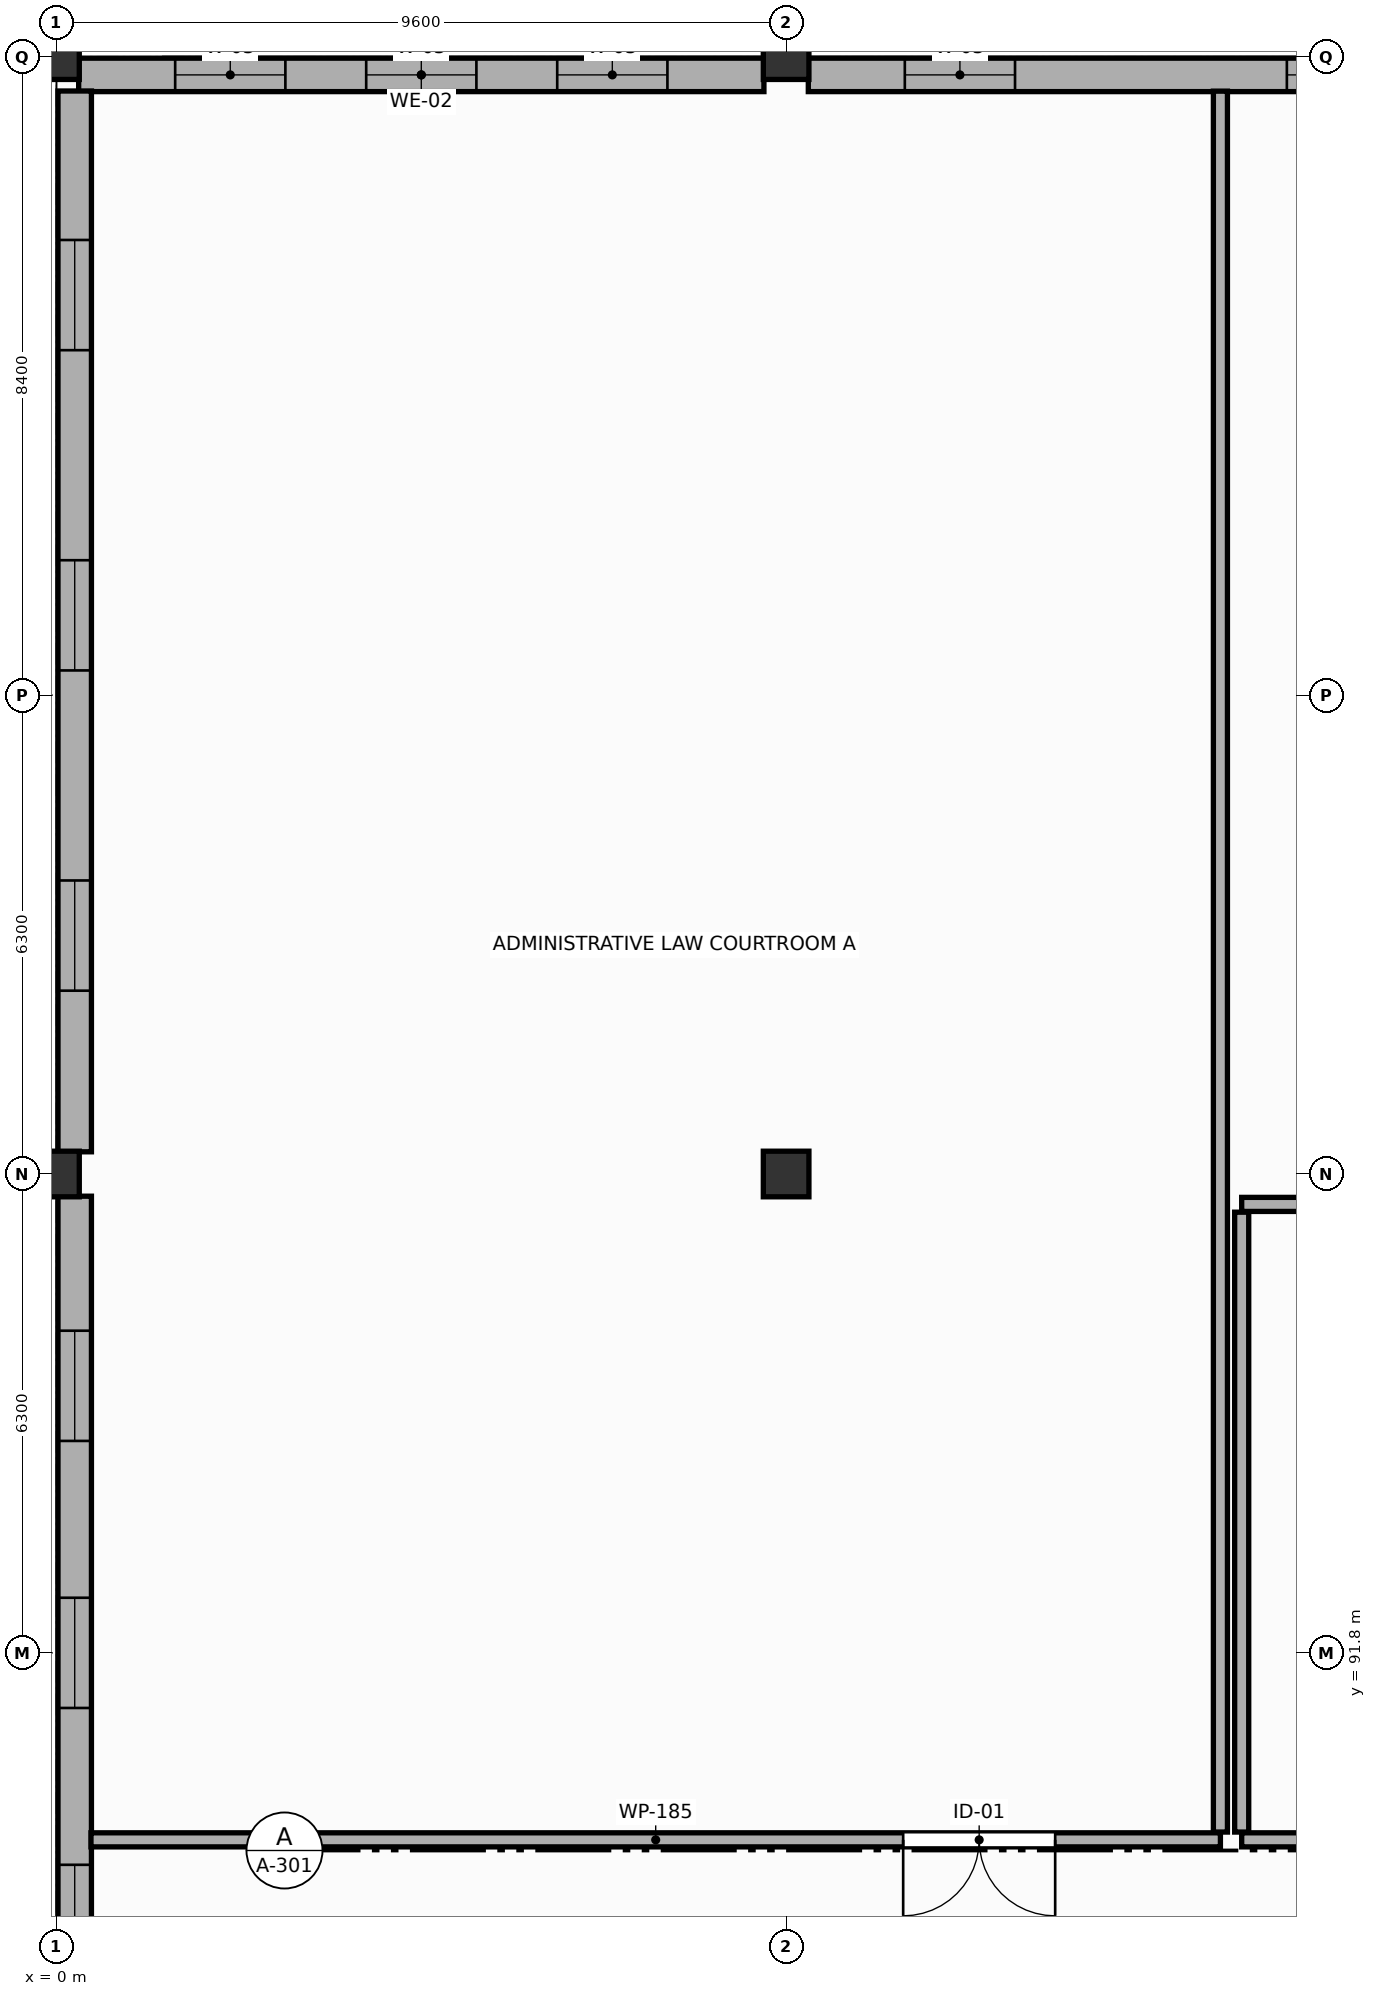
"""IFC4 building model, lengths in metres.
Left out: names, types, materials, properties, quantities, classifications, styles, units other than length and angle.
Written with IfcOpenShell. Run it as: python <this file> out.ifc"""

import sys

from ifc_helpers import new_model, si_unit, direction, frame, frame_2d, origin, origin_2d, place, context, subcontext, project, spatial, rectangle, extrude, element, fill, save


model = new_model("IFC4")
c1 = context("Model", 3, precision=1e-05, world=origin(), true_north=direction((0.0, 1.0)))
c2 = subcontext(c1, "Body", "Model", "MODEL_VIEW")
j1 = project(units=[si_unit("LENGTHUNIT", "METRE"), si_unit("PLANEANGLEUNIT", "RADIAN")], contexts=[c1])
p1 = place(None, origin())
s1 = spatial("IfcSite", under=j1, at=p1, CompositionType="ELEMENT")
p2 = place(p1, origin())
s2 = spatial("IfcBuilding", under=s1, at=p2, CompositionType="ELEMENT")
p3 = place(p2, frame((0.0, 0.0, 14.4)))
s3 = spatial("IfcBuildingStorey", under=s2, at=p3, CompositionType="ELEMENT", Elevation=14.4)
for number, where, z_axis, x_axis in (
    (1, (0.0, 98.1, 0.0), (0.0, 0.0, 1.0), (1.0, 0.0, 0.0)),
    (2, (0.0, 112.8, 0.0), (0.0, 0.0, 1.0), (1.0, 0.0, 0.0)),
    (3, (9.6, 98.1, 0.0), (0.0, 0.0, 1.0), (1.0, 0.0, 0.0)),
    (4, (9.6, 112.8, 0.0), (0.0, 0.0, 1.0), (1.0, 0.0, 0.0)),
):
    element("IfcColumn", number, at=place(p3, frame(where, z_axis=z_axis, x_axis=x_axis)), inside=s3, PredefinedType="COLUMN", context=c2, shape_type="SweptSolid", body=[
        extrude(rectangle(XDim=0.6, YDim=0.6, at=origin_2d()), origin(), (0.0, 0.0, 1.0), 4.2),
    ])
p4 = place(p3, frame((0.292, 112.56, 0.0), z_axis=(0.0, 0.0, 1.0), x_axis=(1.0, 0.0, 0.0)))
e5 = element("IfcWall", 5, at=p4, inside=s3, PredefinedType="STANDARD", context=c2, shape_type="SweptSolid", body=[
    extrude(rectangle(XDim=9.016, YDim=0.44, at=frame_2d((4.508, 0.0))), origin(), (0.0, 0.0, 1.0), 3.04),
])
p5 = place(p4, frame((1.27, 0.0, 0.77)))
e6 = element("IfcOpeningElement", 6, at=p5, cuts=e5, PredefinedType="OPENING", context=c2, shape_type="SweptSolid", body=[
    extrude(rectangle(XDim=1.45, YDim=2.05, at=frame_2d((0.725, 1.025))), frame((0.0, 0.23, 0.0), z_axis=(0.0, -1.0, 0.0), x_axis=(1.0, 0.0, 0.0)), (0.0, 0.0, 1.0), 0.46),
])
p6 = place(p4, frame((3.783, 0.0, 0.77)))
e7 = element("IfcOpeningElement", 7, at=p6, cuts=e5, PredefinedType="OPENING", context=c2, shape_type="SweptSolid", body=[
    extrude(rectangle(XDim=1.45, YDim=2.05, at=frame_2d((0.725, 1.025))), frame((0.0, 0.23, 0.0), z_axis=(0.0, -1.0, 0.0), x_axis=(1.0, 0.0, 0.0)), (0.0, 0.0, 1.0), 0.46),
])
p7 = place(p4, frame((6.296, 0.0, 0.77)))
e8 = element("IfcOpeningElement", 8, at=p7, cuts=e5, PredefinedType="OPENING", context=c2, shape_type="SweptSolid", body=[
    extrude(rectangle(XDim=1.45, YDim=2.05, at=frame_2d((0.725, 1.025))), frame((0.0, 0.23, 0.0), z_axis=(0.0, -1.0, 0.0), x_axis=(1.0, 0.0, 0.0)), (0.0, 0.0, 1.0), 0.46),
])
p8 = place(p3, frame((9.892, 112.56, 0.0), z_axis=(0.0, 0.0, 1.0), x_axis=(1.0, 0.0, 0.0)))
e9 = element("IfcWall", 9, at=p8, inside=s3, PredefinedType="STANDARD", context=c2, shape_type="SweptSolid", body=[
    extrude(rectangle(XDim=9.016, YDim=0.44, at=frame_2d((4.508, 0.0))), origin(), (0.0, 0.0, 1.0), 3.04),
])
p9 = place(p8, frame((1.27, 0.0, 0.77)))
e10 = element("IfcOpeningElement", 10, at=p9, cuts=e9, PredefinedType="OPENING", context=c2, shape_type="SweptSolid", body=[
    extrude(rectangle(XDim=1.45, YDim=2.05, at=frame_2d((0.725, 1.025))), frame((0.0, 0.23, 0.0), z_axis=(0.0, -1.0, 0.0), x_axis=(1.0, 0.0, 0.0)), (0.0, 0.0, 1.0), 0.46),
])
p10 = place(p8, frame((6.296, 0.0, 0.77)))
e11 = element("IfcOpeningElement", 11, at=p10, cuts=e9, PredefinedType="OPENING", context=c2, shape_type="SweptSolid", body=[
    extrude(rectangle(XDim=1.45, YDim=2.05, at=frame_2d((0.725, 1.025))), frame((0.0, 0.23, 0.0), z_axis=(0.0, -1.0, 0.0), x_axis=(1.0, 0.0, 0.0)), (0.0, 0.0, 1.0), 0.46),
])
p11 = place(p3, frame((0.24, 85.792, 0.0), z_axis=(0.0, 0.0, 1.0), x_axis=(0.0, 1.0, 0.0)))
e12 = element("IfcWall", 12, at=p11, inside=s3, PredefinedType="STANDARD", context=c2, shape_type="SweptSolid", body=[
    extrude(rectangle(XDim=12.016, YDim=0.44, at=frame_2d((6.008, 0.0))), origin(), (0.0, 0.0, 1.0), 3.04),
])
p12 = place(p11, frame((1.77, 0.0, 0.77)))
e13 = element("IfcOpeningElement", 13, at=p12, cuts=e12, PredefinedType="OPENING", context=c2, shape_type="SweptSolid", body=[
    extrude(rectangle(XDim=1.45, YDim=2.05, at=frame_2d((0.725, 1.025))), frame((0.0, 0.23, 0.0), z_axis=(0.0, -1.0, 0.0), x_axis=(1.0, 0.0, 0.0)), (0.0, 0.0, 1.0), 0.46),
])
p13 = place(p11, frame((5.283, 0.0, 0.77)))
e14 = element("IfcOpeningElement", 14, at=p13, cuts=e12, PredefinedType="OPENING", context=c2, shape_type="SweptSolid", body=[
    extrude(rectangle(XDim=1.45, YDim=2.05, at=frame_2d((0.725, 1.025))), frame((0.0, 0.23, 0.0), z_axis=(0.0, -1.0, 0.0), x_axis=(1.0, 0.0, 0.0)), (0.0, 0.0, 1.0), 0.46),
])
p14 = place(p11, frame((8.796, 0.0, 0.77)))
e15 = element("IfcOpeningElement", 15, at=p14, cuts=e12, PredefinedType="OPENING", context=c2, shape_type="SweptSolid", body=[
    extrude(rectangle(XDim=1.45, YDim=2.05, at=frame_2d((0.725, 1.025))), frame((0.0, 0.23, 0.0), z_axis=(0.0, -1.0, 0.0), x_axis=(1.0, 0.0, 0.0)), (0.0, 0.0, 1.0), 0.46),
])
p15 = place(p3, frame((0.24, 98.392, 0.0), z_axis=(0.0, 0.0, 1.0), x_axis=(0.0, 1.0, 0.0)))
e16 = element("IfcWall", 16, at=p15, inside=s3, PredefinedType="STANDARD", context=c2, shape_type="SweptSolid", body=[
    extrude(rectangle(XDim=13.956, YDim=0.44, at=frame_2d((6.978, 0.0))), origin(), (0.0, 0.0, 1.0), 3.04),
])
p16 = place(p15, frame((2.12, 0.0, 0.77)))
e17 = element("IfcOpeningElement", 17, at=p16, cuts=e16, PredefinedType="OPENING", context=c2, shape_type="SweptSolid", body=[
    extrude(rectangle(XDim=1.45, YDim=2.05, at=frame_2d((0.725, 1.025))), frame((0.0, 0.23, 0.0), z_axis=(0.0, -1.0, 0.0), x_axis=(1.0, 0.0, 0.0)), (0.0, 0.0, 1.0), 0.46),
])
p17 = place(p15, frame((6.333, 0.0, 0.77)))
e18 = element("IfcOpeningElement", 18, at=p17, cuts=e16, PredefinedType="OPENING", context=c2, shape_type="SweptSolid", body=[
    extrude(rectangle(XDim=1.45, YDim=2.05, at=frame_2d((0.725, 1.025))), frame((0.0, 0.23, 0.0), z_axis=(0.0, -1.0, 0.0), x_axis=(1.0, 0.0, 0.0)), (0.0, 0.0, 1.0), 0.46),
])
p18 = place(p15, frame((10.546, 0.0, 0.77)))
e19 = element("IfcOpeningElement", 19, at=p18, cuts=e16, PredefinedType="OPENING", context=c2, shape_type="SweptSolid", body=[
    extrude(rectangle(XDim=1.45, YDim=2.05, at=frame_2d((0.725, 1.025))), frame((0.0, 0.23, 0.0), z_axis=(0.0, -1.0, 0.0), x_axis=(1.0, 0.0, 0.0)), (0.0, 0.0, 1.0), 0.46),
])
p19 = place(p3, frame((15.314, 89.34, 0.0), z_axis=(0.0, 0.0, 1.0), x_axis=(-1.0, 0.0, 0.0)))
e20 = element("IfcWall", 20, at=p19, inside=s3, PredefinedType="PARTITIONING", context=c2, shape_type="SweptSolid", body=[
    extrude(rectangle(XDim=14.86, YDim=0.185, at=frame_2d((7.43, 0.0))), origin(), (0.0, 0.0, 1.0), 3.09),
])
p20 = place(p19, frame((2.174, 0.0, 0.0)))
e21 = element("IfcOpeningElement", 21, at=p20, cuts=e20, PredefinedType="OPENING", context=c2, shape_type="SweptSolid", body=[
    extrude(rectangle(XDim=2.0, YDim=2.5, at=frame_2d((1.0, 1.25))), frame((0.0, 0.103, 0.0), z_axis=(0.0, -1.0, 0.0), x_axis=(1.0, 0.0, 0.0)), (0.0, 0.0, 1.0), 0.205),
])
p21 = place(p3, frame((15.314, 112.346, 0.0), z_axis=(0.0, 0.0, 1.0), x_axis=(0.0, -1.0, 0.0)))
e22 = element("IfcWall", 22, at=p21, inside=s3, PredefinedType="PARTITIONING", context=c2, shape_type="SweptSolid", body=[
    extrude(rectangle(XDim=22.904, YDim=0.185, at=frame_2d((11.452, 0.0))), origin(), (0.0, 0.0, 1.0), 3.29),
])
p22 = place(p3, frame((15.594, 97.7, 0.0), z_axis=(0.0, 0.0, 1.0), x_axis=(1.0, 0.0, 0.0)))
e23 = element("IfcWall", 23, at=p22, inside=s3, PredefinedType="PARTITIONING", context=c2, shape_type="SweptSolid", body=[
    extrude(rectangle(XDim=10.466, YDim=0.185, at=frame_2d((5.233, 0.0))), origin(), (0.0, 0.0, 1.0), 3.04),
])
p23 = place(p3, frame((26.06, 89.34, 0.0), z_axis=(0.0, 0.0, 1.0), x_axis=(-1.0, 0.0, 0.0)))
e24 = element("IfcWall", 24, at=p23, inside=s3, PredefinedType="PARTITIONING", context=c2, shape_type="SweptSolid", body=[
    extrude(rectangle(XDim=10.466, YDim=0.185, at=frame_2d((5.233, 0.0))), origin(), (0.0, 0.0, 1.0), 3.09),
])
p24 = place(p23, frame((1.903, 0.0, 0.0)))
e25 = element("IfcOpeningElement", 25, at=p24, cuts=e24, PredefinedType="OPENING", context=c2, shape_type="SweptSolid", body=[
    extrude(rectangle(XDim=2.0, YDim=2.5, at=frame_2d((1.0, 1.25))), frame((0.0, 0.103, 0.0), z_axis=(0.0, -1.0, 0.0), x_axis=(1.0, 0.0, 0.0)), (0.0, 0.0, 1.0), 0.205),
])
p25 = place(p3, frame((15.594, 89.442, 0.0), z_axis=(0.0, 0.0, 1.0), x_axis=(0.0, 1.0, 0.0)))
e26 = element("IfcWall", 26, at=p25, inside=s3, PredefinedType="PARTITIONING", context=c2, shape_type="SweptSolid", body=[
    extrude(rectangle(XDim=8.155, YDim=0.185, at=frame_2d((4.078, 0.0))), origin(), (0.0, 0.0, 1.0), 3.34),
])
p26 = place(p5, origin())
e27 = element("IfcWindow", 27, at=p26, inside=s3, PartitioningType="SINGLE_PANEL", PredefinedType="WINDOW", context=c2, shape_type="SweptSolid", body=[
    extrude(rectangle(XDim=1.45, YDim=2.05, at=frame_2d((0.725, 1.025))), frame((0.0, 0.03, 0.0), z_axis=(0.0, -1.0, 0.0), x_axis=(1.0, 0.0, 0.0)), (0.0, 0.0, 1.0), 0.06),
])
fill(e6, e27)
p27 = place(p6, origin())
e28 = element("IfcWindow", 28, at=p27, inside=s3, PartitioningType="SINGLE_PANEL", PredefinedType="WINDOW", context=c2, shape_type="SweptSolid", body=[
    extrude(rectangle(XDim=1.45, YDim=2.05, at=frame_2d((0.725, 1.025))), frame((0.0, 0.03, 0.0), z_axis=(0.0, -1.0, 0.0), x_axis=(1.0, 0.0, 0.0)), (0.0, 0.0, 1.0), 0.06),
])
fill(e7, e28)
p28 = place(p7, origin())
e29 = element("IfcWindow", 29, at=p28, inside=s3, PartitioningType="SINGLE_PANEL", PredefinedType="WINDOW", context=c2, shape_type="SweptSolid", body=[
    extrude(rectangle(XDim=1.45, YDim=2.05, at=frame_2d((0.725, 1.025))), frame((0.0, 0.03, 0.0), z_axis=(0.0, -1.0, 0.0), x_axis=(1.0, 0.0, 0.0)), (0.0, 0.0, 1.0), 0.06),
])
fill(e8, e29)
p29 = place(p9, origin())
e30 = element("IfcWindow", 30, at=p29, inside=s3, PartitioningType="SINGLE_PANEL", PredefinedType="WINDOW", context=c2, shape_type="SweptSolid", body=[
    extrude(rectangle(XDim=1.45, YDim=2.05, at=frame_2d((0.725, 1.025))), frame((0.0, 0.03, 0.0), z_axis=(0.0, -1.0, 0.0), x_axis=(1.0, 0.0, 0.0)), (0.0, 0.0, 1.0), 0.06),
])
fill(e10, e30)
p30 = place(p10, origin())
e31 = element("IfcWindow", 31, at=p30, inside=s3, PartitioningType="SINGLE_PANEL", PredefinedType="WINDOW", context=c2, shape_type="SweptSolid", body=[
    extrude(rectangle(XDim=1.45, YDim=2.05, at=frame_2d((0.725, 1.025))), frame((0.0, 0.03, 0.0), z_axis=(0.0, -1.0, 0.0), x_axis=(1.0, 0.0, 0.0)), (0.0, 0.0, 1.0), 0.06),
])
fill(e11, e31)
p31 = place(p12, origin())
e32 = element("IfcWindow", 32, at=p31, inside=s3, PartitioningType="SINGLE_PANEL", PredefinedType="WINDOW", context=c2, shape_type="SweptSolid", body=[
    extrude(rectangle(XDim=1.45, YDim=2.05, at=frame_2d((0.725, 1.025))), frame((0.0, 0.03, 0.0), z_axis=(0.0, -1.0, 0.0), x_axis=(1.0, 0.0, 0.0)), (0.0, 0.0, 1.0), 0.06),
])
fill(e13, e32)
p32 = place(p13, origin())
e33 = element("IfcWindow", 33, at=p32, inside=s3, PartitioningType="SINGLE_PANEL", PredefinedType="WINDOW", context=c2, shape_type="SweptSolid", body=[
    extrude(rectangle(XDim=1.45, YDim=2.05, at=frame_2d((0.725, 1.025))), frame((0.0, 0.03, 0.0), z_axis=(0.0, -1.0, 0.0), x_axis=(1.0, 0.0, 0.0)), (0.0, 0.0, 1.0), 0.06),
])
fill(e14, e33)
p33 = place(p14, origin())
e34 = element("IfcWindow", 34, at=p33, inside=s3, PartitioningType="SINGLE_PANEL", PredefinedType="WINDOW", context=c2, shape_type="SweptSolid", body=[
    extrude(rectangle(XDim=1.45, YDim=2.05, at=frame_2d((0.725, 1.025))), frame((0.0, 0.03, 0.0), z_axis=(0.0, -1.0, 0.0), x_axis=(1.0, 0.0, 0.0)), (0.0, 0.0, 1.0), 0.06),
])
fill(e15, e34)
p34 = place(p16, origin())
e35 = element("IfcWindow", 35, at=p34, inside=s3, PartitioningType="SINGLE_PANEL", PredefinedType="WINDOW", context=c2, shape_type="SweptSolid", body=[
    extrude(rectangle(XDim=1.45, YDim=2.05, at=frame_2d((0.725, 1.025))), frame((0.0, 0.03, 0.0), z_axis=(0.0, -1.0, 0.0), x_axis=(1.0, 0.0, 0.0)), (0.0, 0.0, 1.0), 0.06),
])
fill(e17, e35)
p35 = place(p17, origin())
e36 = element("IfcWindow", 36, at=p35, inside=s3, PartitioningType="SINGLE_PANEL", PredefinedType="WINDOW", context=c2, shape_type="SweptSolid", body=[
    extrude(rectangle(XDim=1.45, YDim=2.05, at=frame_2d((0.725, 1.025))), frame((0.0, 0.03, 0.0), z_axis=(0.0, -1.0, 0.0), x_axis=(1.0, 0.0, 0.0)), (0.0, 0.0, 1.0), 0.06),
])
fill(e18, e36)
p36 = place(p18, origin())
e37 = element("IfcWindow", 37, at=p36, inside=s3, PartitioningType="SINGLE_PANEL", PredefinedType="WINDOW", context=c2, shape_type="SweptSolid", body=[
    extrude(rectangle(XDim=1.45, YDim=2.05, at=frame_2d((0.725, 1.025))), frame((0.0, 0.03, 0.0), z_axis=(0.0, -1.0, 0.0), x_axis=(1.0, 0.0, 0.0)), (0.0, 0.0, 1.0), 0.06),
])
fill(e19, e37)
p37 = place(p20, origin())
e38 = element("IfcDoor", 38, at=p37, inside=s3, OperationType="DOUBLE_DOOR_SINGLE_SWING", PredefinedType="DOOR", context=c2, shape_type="SweptSolid", body=[
    extrude(rectangle(XDim=2.0, YDim=2.5, at=frame_2d((1.0, 1.25))), frame((0.0, 0.025, 0.0), z_axis=(0.0, -1.0, 0.0), x_axis=(1.0, 0.0, 0.0)), (0.0, 0.0, 1.0), 0.05),
])
fill(e21, e38)
save(model, sys.argv[1])
